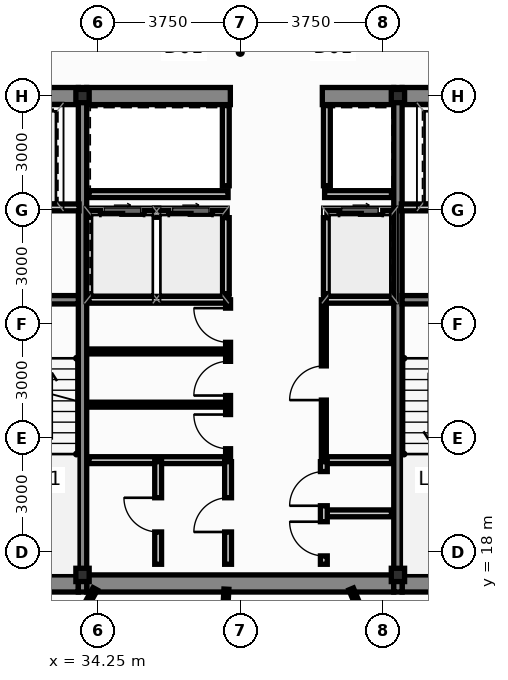
"""IFC4 building model, lengths in metres.
Left out: names, types, materials, properties, quantities, classifications, styles, units other than length and angle.
Written with IfcOpenShell. Run it as: python <this file> out.ifc"""

import sys

from ifc_helpers import new_model, si_unit, direction, frame, frame_2d, origin, origin_2d, place, context, subcontext, project, spatial, rectangle, hollow_rectangle, extrude, source, transform, mapped, element, fill, save


model = new_model("IFC4")
c1 = context("Model", 3, precision=1e-05, world=origin(), true_north=direction((0.0, 1.0)))
c2 = subcontext(c1, "Body", "Model", "MODEL_VIEW")
j1 = project(units=[si_unit("LENGTHUNIT", "METRE"), si_unit("PLANEANGLEUNIT", "RADIAN")], contexts=[c1])
p1 = place(None, origin())
s1 = spatial("IfcSite", under=j1, at=p1, CompositionType="ELEMENT")
p2 = place(p1, origin())
s2 = spatial("IfcBuilding", under=s1, at=p2, CompositionType="ELEMENT")
p3 = place(p2, frame((0.0, 0.0, 187.7)))
s3 = spatial("IfcBuildingStorey", under=s2, at=p3, CompositionType="ELEMENT", Elevation=187.7)
m1 = source(origin(), c2, "Body", "SweptSolid", [
    extrude(hollow_rectangle(XDim=0.35, YDim=0.35, WallThickness=0.016, at=origin_2d()), origin(), (0.0, 0.0, 1.0), 3.65),
])
for number, where, z_axis, x_axis in (
    (1, (33.85, 17.4, 0.0), (0.0, 0.0, 1.0), (1.0, 0.0, 0.0)),
    (2, (42.15, 17.4, 0.0), (0.0, 0.0, 1.0), (1.0, 0.0, 0.0)),
    (3, (33.85, 30.0, 0.0), (0.0, 0.0, 1.0), (1.0, 0.0, 0.0)),
    (4, (42.15, 30.0, 0.0), (0.0, 0.0, 1.0), (1.0, 0.0, 0.0)),
):
    element("IfcColumn", number, at=place(p3, frame(where, z_axis=z_axis, x_axis=x_axis)), inside=s3, PredefinedType="COLUMN", context=c2, shape_type="MappedRepresentation", body=[
        mapped(m1, transform((0.0, 0.0, 0.0), scale=1.0)),
    ])
p4 = place(p3, frame((30.84, 17.175, 0.0), z_axis=(0.0, 0.0, 1.0), x_axis=(1.0, 0.0, 0.0)))
e5 = element("IfcWall", 5, at=p4, inside=s3, PredefinedType="SHEAR", context=c2, shape_type="SweptSolid", body=[
    extrude(rectangle(XDim=2.9, YDim=0.45, at=frame_2d((1.45, 0.0))), origin(), (0.0, 0.0, 1.0), 3.65),
])
p5 = place(p3, frame((33.96, 17.175, 0.0), z_axis=(0.0, 0.0, 1.0), x_axis=(1.0, 0.0, 0.0)))
e6 = element("IfcWall", 6, at=p5, inside=s3, PredefinedType="SHEAR", context=c2, shape_type="SweptSolid", body=[
    extrude(rectangle(XDim=8.08, YDim=0.45, at=frame_2d((4.04, 0.0))), origin(), (0.0, 0.0, 1.0), 3.65),
])
for number, where, z_axis, x_axis in (
    (7, (42.26, 17.175, 0.0), (0.0, 0.0, 1.0), (1.0, 0.0, 0.0)),
    (8, (30.84, 30.0, 0.0), (0.0, 0.0, 1.0), (1.0, 0.0, 0.0)),
):
    element("IfcWall", number, at=place(p3, frame(where, z_axis=z_axis, x_axis=x_axis)), inside=s3, PredefinedType="SHEAR", context=c2, shape_type="SweptSolid", body=[
        extrude(rectangle(XDim=2.9, YDim=0.45, at=frame_2d((1.45, 0.0))), origin(), (0.0, 0.0, 1.0), 3.65),
    ])
p6 = place(p3, frame((33.96, 30.0, 0.0), z_axis=(0.0, 0.0, 1.0), x_axis=(1.0, 0.0, 0.0)))
e9 = element("IfcWall", 9, at=p6, inside=s3, PredefinedType="SHEAR", context=c2, shape_type="SweptSolid", body=[
    extrude(rectangle(XDim=3.78, YDim=0.45, at=frame_2d((1.89, 0.0))), origin(), (0.0, 0.0, 1.0), 3.65),
])
p7 = place(p3, frame((40.16, 30.0, 0.0), z_axis=(0.0, 0.0, 1.0), x_axis=(1.0, 0.0, 0.0)))
e10 = element("IfcWall", 10, at=p7, inside=s3, PredefinedType="SHEAR", context=c2, shape_type="SweptSolid", body=[
    extrude(rectangle(XDim=1.88, YDim=0.45, at=frame_2d((0.94, 0.0))), origin(), (0.0, 0.0, 1.0), 3.65),
])
p8 = place(p3, frame((42.26, 30.0, 0.0), z_axis=(0.0, 0.0, 1.0), x_axis=(1.0, 0.0, 0.0)))
e11 = element("IfcWall", 11, at=p8, inside=s3, PredefinedType="SHEAR", context=c2, shape_type="SweptSolid", body=[
    extrude(rectangle(XDim=2.9, YDim=0.45, at=frame_2d((1.45, 0.0))), origin(), (0.0, 0.0, 1.0), 3.65),
])
for number, where, z_axis, x_axis in (
    (12, (33.85, 16.95, 0.0), (0.0, 0.0, 1.0), (0.0, 1.0, 0.0)),
    (13, (42.15, 16.95, 0.0), (0.0, 0.0, 1.0), (0.0, 1.0, 0.0)),
):
    element("IfcWall", number, at=place(p3, frame(where, z_axis=z_axis, x_axis=x_axis)), inside=s3, PredefinedType="SHEAR", context=c2, shape_type="SweptSolid", body=[
        extrude(rectangle(XDim=13.275, YDim=0.22, at=frame_2d((6.638, 0.0))), origin(), (0.0, 0.0, 1.0), 3.65),
    ])
for number, where, z_axis, x_axis in (
    (14, (30.84, 24.64, 0.0), (0.0, 0.0, 1.0), (1.0, 0.0, 0.0)),
    (15, (42.26, 24.64, 0.0), (0.0, 0.0, 1.0), (1.0, 0.0, 0.0)),
):
    element("IfcWall", number, at=place(p3, frame(where, z_axis=z_axis, x_axis=x_axis)), inside=s3, PredefinedType="SHEAR", context=c2, shape_type="SweptSolid", body=[
        extrude(rectangle(XDim=2.9, YDim=0.22, at=frame_2d((1.45, 0.0))), origin(), (0.0, 0.0, 1.0), 3.65),
    ])
p9 = place(p3, frame((34.02, 26.9, 0.0), z_axis=(0.0, 0.0, 1.0), x_axis=(1.0, 0.0, 0.0)))
e16 = element("IfcWall", 16, at=p9, inside=s3, PredefinedType="PARTITIONING", context=c2, shape_type="SweptSolid", body=[
    extrude(rectangle(XDim=3.6, YDim=0.18, at=frame_2d((1.8, 0.0))), origin(), (0.0, 0.0, 1.0), 3.4),
])
p10 = place(p9, frame((0.3, 0.0, 0.0)))
e17 = element("IfcOpeningElement", 17, at=p10, cuts=e16, PredefinedType="OPENING", context=c2, shape_type="SweptSolid", body=[
    extrude(rectangle(XDim=1.15, YDim=2.2, at=frame_2d((0.575, 1.1))), frame((0.0, 0.102, 0.0), z_axis=(0.0, -1.0, 0.0), x_axis=(1.0, 0.0, 0.0)), (0.0, 0.0, 1.0), 0.204),
])
p11 = place(p9, frame((2.1, 0.0, 0.0)))
e18 = element("IfcOpeningElement", 18, at=p11, cuts=e16, PredefinedType="OPENING", context=c2, shape_type="SweptSolid", body=[
    extrude(rectangle(XDim=1.15, YDim=2.2, at=frame_2d((0.575, 1.1))), frame((0.0, 0.102, 0.0), z_axis=(0.0, -1.0, 0.0), x_axis=(1.0, 0.0, 0.0)), (0.0, 0.0, 1.0), 0.204),
])
p12 = place(p3, frame((40.28, 26.9, 0.0), z_axis=(0.0, 0.0, 1.0), x_axis=(1.0, 0.0, 0.0)))
e19 = element("IfcWall", 19, at=p12, inside=s3, PredefinedType="PARTITIONING", context=c2, shape_type="SweptSolid", body=[
    extrude(rectangle(XDim=1.7, YDim=0.18, at=frame_2d((0.85, 0.0))), origin(), (0.0, 0.0, 1.0), 3.4),
])
p13 = place(p12, frame((0.32, 0.0, 0.0)))
e20 = element("IfcOpeningElement", 20, at=p13, cuts=e19, PredefinedType="OPENING", context=c2, shape_type="SweptSolid", body=[
    extrude(rectangle(XDim=1.15, YDim=2.2, at=frame_2d((0.575, 1.1))), frame((0.0, 0.102, 0.0), z_axis=(0.0, -1.0, 0.0), x_axis=(1.0, 0.0, 0.0)), (0.0, 0.0, 1.0), 0.204),
])
for number, where, z_axis, x_axis in (
    (21, (37.62, 24.8, 0.0), (0.0, 0.0, 1.0), (0.0, 1.0, 0.0)),
    (22, (40.28, 24.8, 0.0), (0.0, 0.0, 1.0), (0.0, 1.0, 0.0)),
):
    element("IfcWall", number, at=place(p3, frame(where, z_axis=z_axis, x_axis=x_axis)), inside=s3, PredefinedType="PARTITIONING", context=c2, shape_type="SweptSolid", body=[
        extrude(rectangle(XDim=2.0, YDim=0.18, at=frame_2d((1.0, 0.0))), origin(), (0.0, 0.0, 1.0), 3.4),
    ])
p14 = place(p3, frame((34.02, 24.64, 0.0), z_axis=(0.0, 0.0, 1.0), x_axis=(1.0, 0.0, 0.0)))
e23 = element("IfcWall", 23, at=p14, inside=s3, PredefinedType="PARTITIONING", context=c2, shape_type="SweptSolid", body=[
    extrude(rectangle(XDim=3.68, YDim=0.18, at=frame_2d((1.84, 0.0))), origin(), (0.0, 0.0, 1.0), 3.4),
])
p15 = place(p3, frame((40.2, 24.64, 0.0), z_axis=(0.0, 0.0, 1.0), x_axis=(1.0, 0.0, 0.0)))
e24 = element("IfcWall", 24, at=p15, inside=s3, PredefinedType="PARTITIONING", context=c2, shape_type="SweptSolid", body=[
    extrude(rectangle(XDim=1.78, YDim=0.18, at=frame_2d((0.89, 0.0))), origin(), (0.0, 0.0, 1.0), 3.4),
])
p16 = place(p3, frame((34.02, 27.42, 0.0), z_axis=(0.0, 0.0, 1.0), x_axis=(1.0, 0.0, 0.0)))
e25 = element("IfcWall", 25, at=p16, inside=s3, PredefinedType="PARTITIONING", context=c2, shape_type="SweptSolid", body=[
    extrude(rectangle(XDim=3.66, YDim=0.18, at=frame_2d((1.83, 0.0))), origin(), (0.0, 0.0, 1.0), 3.4),
])
p17 = place(p3, frame((40.22, 27.42, 0.0), z_axis=(0.0, 0.0, 1.0), x_axis=(1.0, 0.0, 0.0)))
e26 = element("IfcWall", 26, at=p17, inside=s3, PredefinedType="PARTITIONING", context=c2, shape_type="SweptSolid", body=[
    extrude(rectangle(XDim=1.76, YDim=0.18, at=frame_2d((0.88, 0.0))), origin(), (0.0, 0.0, 1.0), 3.4),
])
for number, where, z_axis, x_axis in (
    (27, (37.62, 27.64, 0.0), (0.0, 0.0, 1.0), (0.0, 1.0, 0.0)),
    (28, (40.28, 27.64, 0.0), (0.0, 0.0, 1.0), (0.0, 1.0, 0.0)),
):
    element("IfcWall", number, at=place(p3, frame(where, z_axis=z_axis, x_axis=x_axis)), inside=s3, PredefinedType="PARTITIONING", context=c2, shape_type="SweptSolid", body=[
        extrude(rectangle(XDim=2.11, YDim=0.18, at=frame_2d((1.055, 0.0))), origin(), (0.0, 0.0, 1.0), 3.4),
    ])
for number, where, z_axis, x_axis in (
    (29, (30.86, 27.07, 0.0), (0.0, 0.0, 1.0), (1.0, 0.0, 0.0)),
    (30, (42.24, 27.07, 0.0), (0.0, 0.0, 1.0), (1.0, 0.0, 0.0)),
):
    element("IfcWall", number, at=place(p3, frame(where, z_axis=z_axis, x_axis=x_axis)), inside=s3, PredefinedType="PARTITIONING", context=c2, shape_type="SweptSolid", body=[
        extrude(rectangle(XDim=2.9, YDim=0.18, at=frame_2d((1.45, 0.0))), origin(), (0.0, 0.0, 1.0), 3.4),
    ])
p18 = place(p3, frame((34.02, 20.42, 0.0), z_axis=(0.0, 0.0, 1.0), x_axis=(1.0, 0.0, 0.0)))
e31 = element("IfcWall", 31, at=p18, inside=s3, PredefinedType="PARTITIONING", context=c2, shape_type="SweptSolid", body=[
    extrude(rectangle(XDim=3.64, YDim=0.18, at=frame_2d((1.82, 0.0))), origin(), (0.0, 0.0, 1.0), 3.4),
])
p19 = place(p3, frame((40.22, 20.42, 0.0), z_axis=(0.0, 0.0, 1.0), x_axis=(1.0, 0.0, 0.0)))
e32 = element("IfcWall", 32, at=p19, inside=s3, PredefinedType="PARTITIONING", context=c2, shape_type="SweptSolid", body=[
    extrude(rectangle(XDim=1.76, YDim=0.18, at=frame_2d((0.88, 0.0))), origin(), (0.0, 0.0, 1.0), 3.4),
])
for number, where, z_axis, x_axis in (
    (33, (34.02, 21.88, 0.0), (0.0, 0.0, 1.0), (1.0, 0.0, 0.0)),
    (34, (34.02, 23.28, 0.0), (0.0, 0.0, 1.0), (1.0, 0.0, 0.0)),
):
    element("IfcWall", number, at=place(p3, frame(where, z_axis=z_axis, x_axis=x_axis)), inside=s3, PredefinedType="PARTITIONING", context=c2, shape_type="SweptSolid", body=[
        extrude(rectangle(XDim=3.58, YDim=0.13, at=frame_2d((1.79, 0.0))), origin(), (0.0, 0.0, 1.0), 3.4),
    ])
p20 = place(p3, frame((37.68, 20.5, 0.0), z_axis=(0.0, 0.0, 1.0), x_axis=(0.0, 1.0, 0.0)))
e35 = element("IfcWall", 35, at=p20, inside=s3, PredefinedType="PARTITIONING", context=c2, shape_type="SweptSolid", body=[
    extrude(rectangle(XDim=4.14, YDim=0.13, at=frame_2d((2.07, 0.0))), origin(), (0.0, 0.0, 1.0), 3.4),
])
p21 = place(p20, frame((0.22, 0.0, 0.0)))
e36 = element("IfcOpeningElement", 36, at=p21, cuts=e35, PredefinedType="OPENING", context=c2, shape_type="SweptSolid", body=[
    extrude(rectangle(XDim=0.9, YDim=2.1, at=frame_2d((0.45, 1.05))), frame((0.0, 0.077, 0.0), z_axis=(0.0, -1.0, 0.0), x_axis=(1.0, 0.0, 0.0)), (0.0, 0.0, 1.0), 0.154),
])
p22 = place(p20, frame((1.62, 0.0, 0.0)))
e37 = element("IfcOpeningElement", 37, at=p22, cuts=e35, PredefinedType="OPENING", context=c2, shape_type="SweptSolid", body=[
    extrude(rectangle(XDim=0.9, YDim=2.1, at=frame_2d((0.45, 1.05))), frame((0.0, 0.077, 0.0), z_axis=(0.0, -1.0, 0.0), x_axis=(1.0, 0.0, 0.0)), (0.0, 0.0, 1.0), 0.154),
])
p23 = place(p20, frame((3.02, 0.0, 0.0)))
e38 = element("IfcOpeningElement", 38, at=p23, cuts=e35, PredefinedType="OPENING", context=c2, shape_type="SweptSolid", body=[
    extrude(rectangle(XDim=0.9, YDim=2.1, at=frame_2d((0.45, 1.05))), frame((0.0, 0.077, 0.0), z_axis=(0.0, -1.0, 0.0), x_axis=(1.0, 0.0, 0.0)), (0.0, 0.0, 1.0), 0.154),
])
p24 = place(p3, frame((40.2, 20.5, 0.0), z_axis=(0.0, 0.0, 1.0), x_axis=(0.0, 1.0, 0.0)))
e39 = element("IfcWall", 39, at=p24, inside=s3, PredefinedType="PARTITIONING", context=c2, shape_type="SweptSolid", body=[
    extrude(rectangle(XDim=4.14, YDim=0.13, at=frame_2d((2.07, 0.0))), origin(), (0.0, 0.0, 1.0), 3.4),
])
p25 = place(p24, frame((1.5, 0.0, 0.0)))
e40 = element("IfcOpeningElement", 40, at=p25, cuts=e39, PredefinedType="OPENING", context=c2, shape_type="SweptSolid", body=[
    extrude(rectangle(XDim=0.9, YDim=2.1, at=frame_2d((0.45, 1.05))), frame((0.0, 0.077, 0.0), z_axis=(0.0, -1.0, 0.0), x_axis=(1.0, 0.0, 0.0)), (0.0, 0.0, 1.0), 0.154),
])
p26 = place(p3, frame((35.84, 17.68, 0.0), z_axis=(0.0, 0.0, 1.0), x_axis=(0.0, 1.0, 0.0)))
e41 = element("IfcWall", 41, at=p26, inside=s3, PredefinedType="PARTITIONING", context=c2, shape_type="SweptSolid", body=[
    extrude(rectangle(XDim=2.7, YDim=0.18, at=frame_2d((1.35, 0.0))), origin(), (0.0, 0.0, 1.0), 3.4),
])
p27 = place(p26, frame((0.85, 0.0, 0.0)))
e42 = element("IfcOpeningElement", 42, at=p27, cuts=e41, PredefinedType="OPENING", context=c2, shape_type="SweptSolid", body=[
    extrude(rectangle(XDim=0.9, YDim=2.1, at=frame_2d((0.45, 1.05))), frame((0.0, 0.102, 0.0), z_axis=(0.0, -1.0, 0.0), x_axis=(1.0, 0.0, 0.0)), (0.0, 0.0, 1.0), 0.204),
])
p28 = place(p3, frame((37.68, 17.68, 0.0), z_axis=(0.0, 0.0, 1.0), x_axis=(0.0, 1.0, 0.0)))
e43 = element("IfcWall", 43, at=p28, inside=s3, PredefinedType="PARTITIONING", context=c2, shape_type="SweptSolid", body=[
    extrude(rectangle(XDim=2.7, YDim=0.18, at=frame_2d((1.35, 0.0))), origin(), (0.0, 0.0, 1.0), 3.4),
])
p29 = place(p28, frame((0.85, 0.0, 0.0)))
e44 = element("IfcOpeningElement", 44, at=p29, cuts=e43, PredefinedType="OPENING", context=c2, shape_type="SweptSolid", body=[
    extrude(rectangle(XDim=0.9, YDim=2.1, at=frame_2d((0.45, 1.05))), frame((0.0, 0.102, 0.0), z_axis=(0.0, -1.0, 0.0), x_axis=(1.0, 0.0, 0.0)), (0.0, 0.0, 1.0), 0.204),
])
p30 = place(p3, frame((40.28, 19.02, 0.0), z_axis=(0.0, 0.0, 1.0), x_axis=(1.0, 0.0, 0.0)))
e45 = element("IfcWall", 45, at=p30, inside=s3, PredefinedType="PARTITIONING", context=c2, shape_type="SweptSolid", body=[
    extrude(rectangle(XDim=1.7, YDim=0.18, at=frame_2d((0.85, 0.0))), origin(), (0.0, 0.0, 1.0), 3.4),
])
p31 = place(p3, frame((40.2, 17.68, 0.0), z_axis=(0.0, 0.0, 1.0), x_axis=(0.0, 1.0, 0.0)))
e46 = element("IfcWall", 46, at=p31, inside=s3, PredefinedType="PARTITIONING", context=c2, shape_type="SweptSolid", body=[
    extrude(rectangle(XDim=2.7, YDim=0.18, at=frame_2d((1.35, 0.0))), origin(), (0.0, 0.0, 1.0), 3.4),
])
p32 = place(p31, frame((0.22, 0.0, 0.0)))
e47 = element("IfcOpeningElement", 47, at=p32, cuts=e46, PredefinedType="OPENING", context=c2, shape_type="SweptSolid", body=[
    extrude(rectangle(XDim=0.9, YDim=2.1, at=frame_2d((0.45, 1.05))), frame((0.0, 0.102, 0.0), z_axis=(0.0, -1.0, 0.0), x_axis=(1.0, 0.0, 0.0)), (0.0, 0.0, 1.0), 0.204),
])
p33 = place(p31, frame((1.54, 0.0, 0.0)))
e48 = element("IfcOpeningElement", 48, at=p33, cuts=e46, PredefinedType="OPENING", context=c2, shape_type="SweptSolid", body=[
    extrude(rectangle(XDim=0.9, YDim=2.1, at=frame_2d((0.45, 1.05))), frame((0.0, 0.102, 0.0), z_axis=(0.0, -1.0, 0.0), x_axis=(1.0, 0.0, 0.0)), (0.0, 0.0, 1.0), 0.204),
])
p34 = place(p3, frame((28.602, 6.845, 0.0), z_axis=(0.0, 0.0, 1.0), x_axis=(0.480479744132, 0.877005824085, 0.0)))
e49 = element("IfcWall", 49, at=p34, inside=s3, PredefinedType="PARTITIONING", context=c2, shape_type="SweptSolid", body=[
    extrude(rectangle(XDim=11.618, YDim=0.13, at=frame_2d((5.809, 0.0))), origin(), (0.0, 0.0, 1.0), 3.4),
])
p35 = place(p34, frame((5.383, 0.0, 0.0)))
e50 = element("IfcOpeningElement", 50, at=p35, cuts=e49, PredefinedType="OPENING", context=c2, shape_type="SweptSolid", body=[
    extrude(rectangle(XDim=0.96, YDim=2.15, at=frame_2d((0.48, 1.075))), frame((0.0, 0.077, 0.0), z_axis=(0.0, -1.0, 0.0), x_axis=(1.0, 0.0, 0.0)), (0.0, 0.0, 1.0), 0.154),
])
p36 = place(p3, frame((40.919, 17.031, 0.0), z_axis=(0.0, 0.0, 1.0), x_axis=(0.386038561602, -0.922482644257, 0.0)))
e51 = element("IfcWall", 51, at=p36, inside=s3, PredefinedType="PARTITIONING", context=c2, shape_type="SweptSolid", body=[
    extrude(rectangle(XDim=10.728, YDim=0.13, at=frame_2d((5.364, 0.0))), origin(), (0.0, 0.0, 1.0), 3.4),
])
p37 = place(p36, frame((4.935, 0.0, 0.0)))
e52 = element("IfcOpeningElement", 52, at=p37, cuts=e51, PredefinedType="OPENING", context=c2, shape_type="SweptSolid", body=[
    extrude(rectangle(XDim=0.96, YDim=2.15, at=frame_2d((0.48, 1.075))), frame((0.0, 0.077, 0.0), z_axis=(0.0, -1.0, 0.0), x_axis=(1.0, 0.0, 0.0)), (0.0, 0.0, 1.0), 0.154),
])
p38 = place(p3, frame((37.105, 6.995, 0.0), z_axis=(0.0, 0.0, 1.0), x_axis=(0.052867568887, 0.998601532224, 0.0)))
e53 = element("IfcWall", 53, at=p38, inside=s3, PredefinedType="PARTITIONING", context=c2, shape_type="SweptSolid", body=[
    extrude(rectangle(XDim=10.044, YDim=0.13, at=frame_2d((5.022, 0.0))), origin(), (0.0, 0.0, 1.0), 3.4),
])
p39 = place(p38, frame((4.59, 0.0, 0.0)))
e54 = element("IfcOpeningElement", 54, at=p39, cuts=e53, PredefinedType="OPENING", context=c2, shape_type="SweptSolid", body=[
    extrude(rectangle(XDim=0.96, YDim=2.15, at=frame_2d((0.48, 1.075))), frame((0.0, 0.077, 0.0), z_axis=(0.0, -1.0, 0.0), x_axis=(1.0, 0.0, 0.0)), (0.0, 0.0, 1.0), 0.154),
])
p40 = place(p10, origin())
e55 = element("IfcDoor", 55, at=p40, inside=s3, OperationType="SLIDING_TO_LEFT", PredefinedType="DOOR", context=c2, shape_type="SweptSolid", body=[
    extrude(rectangle(XDim=1.15, YDim=2.2, at=frame_2d((0.575, 1.1))), frame((0.0, 0.025, 0.0), z_axis=(0.0, -1.0, 0.0), x_axis=(1.0, 0.0, 0.0)), (0.0, 0.0, 1.0), 0.05),
])
fill(e17, e55)
p41 = place(p11, origin())
e56 = element("IfcDoor", 56, at=p41, inside=s3, OperationType="SLIDING_TO_RIGHT", PredefinedType="DOOR", context=c2, shape_type="SweptSolid", body=[
    extrude(rectangle(XDim=1.15, YDim=2.2, at=frame_2d((0.575, 1.1))), frame((0.0, 0.025, 0.0), z_axis=(0.0, -1.0, 0.0), x_axis=(1.0, 0.0, 0.0)), (0.0, 0.0, 1.0), 0.05),
])
fill(e18, e56)
p42 = place(p13, origin())
e57 = element("IfcDoor", 57, at=p42, inside=s3, OperationType="SLIDING_TO_LEFT", PredefinedType="DOOR", context=c2, shape_type="SweptSolid", body=[
    extrude(rectangle(XDim=1.15, YDim=2.2, at=frame_2d((0.575, 1.1))), frame((0.0, 0.025, 0.0), z_axis=(0.0, -1.0, 0.0), x_axis=(1.0, 0.0, 0.0)), (0.0, 0.0, 1.0), 0.05),
])
fill(e20, e57)
p43 = place(p21, origin())
e58 = element("IfcDoor", 58, at=p43, inside=s3, OperationType="SINGLE_SWING_RIGHT", PredefinedType="DOOR", context=c2, shape_type="SweptSolid", body=[
    extrude(rectangle(XDim=0.9, YDim=2.1, at=frame_2d((0.45, 1.05))), frame((0.0, 0.025, 0.0), z_axis=(0.0, -1.0, 0.0), x_axis=(1.0, 0.0, 0.0)), (0.0, 0.0, 1.0), 0.05),
])
fill(e36, e58)
p44 = place(p22, origin())
e59 = element("IfcDoor", 59, at=p44, inside=s3, OperationType="SINGLE_SWING_LEFT", PredefinedType="DOOR", context=c2, shape_type="SweptSolid", body=[
    extrude(rectangle(XDim=0.9, YDim=2.1, at=frame_2d((0.45, 1.05))), frame((0.0, 0.025, 0.0), z_axis=(0.0, -1.0, 0.0), x_axis=(1.0, 0.0, 0.0)), (0.0, 0.0, 1.0), 0.05),
])
fill(e37, e59)
p45 = place(p23, origin())
e60 = element("IfcDoor", 60, at=p45, inside=s3, OperationType="SINGLE_SWING_RIGHT", PredefinedType="DOOR", context=c2, shape_type="SweptSolid", body=[
    extrude(rectangle(XDim=0.9, YDim=2.1, at=frame_2d((0.45, 1.05))), frame((0.0, 0.025, 0.0), z_axis=(0.0, -1.0, 0.0), x_axis=(1.0, 0.0, 0.0)), (0.0, 0.0, 1.0), 0.05),
])
fill(e38, e60)
p46 = place(p25, origin())
e61 = element("IfcDoor", 61, at=p46, inside=s3, OperationType="SINGLE_SWING_LEFT", PredefinedType="DOOR", context=c2, shape_type="SweptSolid", body=[
    extrude(rectangle(XDim=0.9, YDim=2.1, at=frame_2d((0.45, 1.05))), frame((0.0, 0.025, 0.0), z_axis=(0.0, -1.0, 0.0), x_axis=(1.0, 0.0, 0.0)), (0.0, 0.0, 1.0), 0.05),
])
fill(e40, e61)
p47 = place(p27, origin())
e62 = element("IfcDoor", 62, at=p47, inside=s3, OperationType="SINGLE_SWING_RIGHT", PredefinedType="DOOR", context=c2, shape_type="SweptSolid", body=[
    extrude(rectangle(XDim=0.9, YDim=2.1, at=frame_2d((0.45, 1.05))), frame((0.0, 0.025, 0.0), z_axis=(0.0, -1.0, 0.0), x_axis=(1.0, 0.0, 0.0)), (0.0, 0.0, 1.0), 0.05),
])
fill(e42, e62)
p48 = place(p29, origin())
e63 = element("IfcDoor", 63, at=p48, inside=s3, OperationType="SINGLE_SWING_LEFT", PredefinedType="DOOR", context=c2, shape_type="SweptSolid", body=[
    extrude(rectangle(XDim=0.9, YDim=2.1, at=frame_2d((0.45, 1.05))), frame((0.0, 0.025, 0.0), z_axis=(0.0, -1.0, 0.0), x_axis=(1.0, 0.0, 0.0)), (0.0, 0.0, 1.0), 0.05),
])
fill(e44, e63)
p49 = place(p32, origin())
e64 = element("IfcDoor", 64, at=p49, inside=s3, OperationType="SINGLE_SWING_RIGHT", PredefinedType="DOOR", context=c2, shape_type="SweptSolid", body=[
    extrude(rectangle(XDim=0.9, YDim=2.1, at=frame_2d((0.45, 1.05))), frame((0.0, 0.025, 0.0), z_axis=(0.0, -1.0, 0.0), x_axis=(1.0, 0.0, 0.0)), (0.0, 0.0, 1.0), 0.05),
])
fill(e47, e64)
p50 = place(p33, origin())
e65 = element("IfcDoor", 65, at=p50, inside=s3, OperationType="SINGLE_SWING_LEFT", PredefinedType="DOOR", context=c2, shape_type="SweptSolid", body=[
    extrude(rectangle(XDim=0.9, YDim=2.1, at=frame_2d((0.45, 1.05))), frame((0.0, 0.025, 0.0), z_axis=(0.0, -1.0, 0.0), x_axis=(1.0, 0.0, 0.0)), (0.0, 0.0, 1.0), 0.05),
])
fill(e48, e65)
save(model, sys.argv[1])
